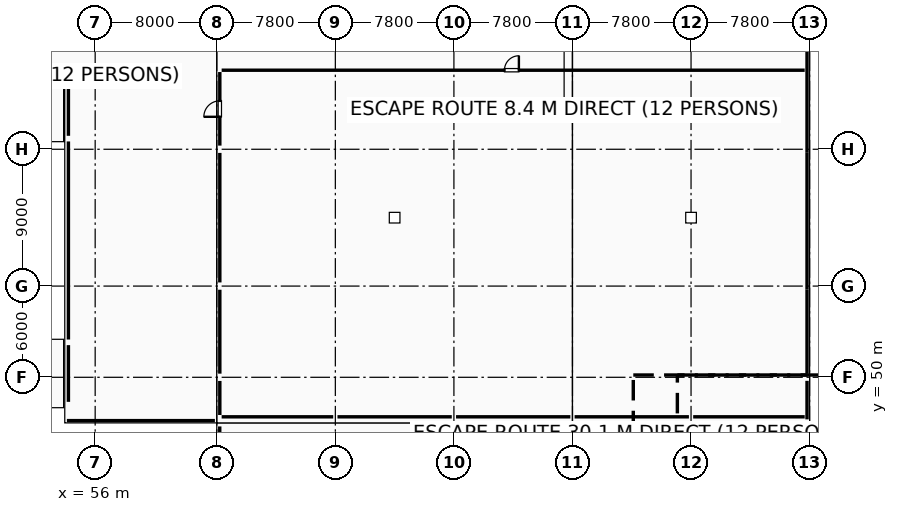
"""IFC4 building model, lengths in metres.
Left out: names, types, materials, properties, quantities, classifications, styles, units other than length and angle.
Written with IfcOpenShell. Run it as: python <this file> out.ifc"""

import sys

from ifc_helpers import new_model, si_unit, direction, frame, frame_2d, origin, origin_2d, place, context, subcontext, project, spatial, rectangle, hollow_rectangle, i_section, extrude, element, fill, save


model = new_model("IFC4")
c1 = context("Model", 3, precision=1e-05, world=origin(), true_north=direction((0.0, 1.0)))
c2 = subcontext(c1, "Body", "Model", "MODEL_VIEW")
j1 = project(units=[si_unit("LENGTHUNIT", "METRE"), si_unit("PLANEANGLEUNIT", "RADIAN")], contexts=[c1])
p1 = place(None, origin())
s1 = spatial("IfcSite", under=j1, at=p1, CompositionType="ELEMENT")
p2 = place(p1, origin())
s2 = spatial("IfcBuilding", under=s1, at=p2, CompositionType="ELEMENT")
p3 = place(p2, frame((0.0, 0.0, 5.4)))
s3 = spatial("IfcBuildingStorey", under=s2, at=p3, CompositionType="ELEMENT", Elevation=5.4)
for number, where, z_axis, x_axis in (
    (1, (56.0, 50.0, 0.0), (0.0, 0.0, 1.0), (1.0, 0.0, 0.0)),
    (2, (56.0, 56.0, 0.0), (0.0, 0.0, 1.0), (1.0, 0.0, 0.0)),
    (3, (56.0, 65.0, 0.0), (0.0, 0.0, 1.0), (1.0, 0.0, 0.0)),
):
    element("IfcColumn", number, at=place(p3, frame(where, z_axis=z_axis, x_axis=x_axis)), inside=s3, PredefinedType="COLUMN", context=c2, shape_type="SweptSolid", body=[
        extrude(rectangle(XDim=0.9, YDim=0.9, at=origin_2d()), origin(), (0.0, 0.0, 1.0), 4.8),
    ])
p4 = place(p3, frame((64.0, 50.0, 0.0), z_axis=(0.0, 0.0, 1.0), x_axis=(1.0, 0.0, 0.0)))
e4 = element("IfcColumn", 4, at=p4, inside=s3, PredefinedType="COLUMN", context=c2, shape_type="SweptSolid", body=[
    extrude(hollow_rectangle(XDim=0.45, YDim=0.45, WallThickness=0.02, at=origin_2d()), origin(), (0.0, 0.0, 1.0), 4.8),
])
for number, where, z_axis, x_axis in (
    (5, (64.0, 56.0, 0.0), (0.0, 0.0, 1.0), (1.0, 0.0, 0.0)),
    (6, (64.0, 65.0, 0.0), (0.0, 0.0, 1.0), (1.0, 0.0, 0.0)),
):
    element("IfcColumn", number, at=place(p3, frame(where, z_axis=z_axis, x_axis=x_axis)), inside=s3, PredefinedType="COLUMN", context=c2, shape_type="SweptSolid", body=[
        extrude(i_section(OverallWidth=0.25, OverallDepth=0.45, WebThickness=0.011, FlangeThickness=0.014, FilletRadius=0.015, at=origin_2d()), origin(), (0.0, 0.0, 1.0), 4.8),
    ])
p5 = place(p3, frame((103.0, 50.0, 0.0), z_axis=(0.0, 0.0, 1.0), x_axis=(1.0, 0.0, 0.0)))
e7 = element("IfcColumn", 7, at=p5, inside=s3, PredefinedType="COLUMN", context=c2, shape_type="SweptSolid", body=[
    extrude(hollow_rectangle(XDim=0.45, YDim=0.45, WallThickness=0.02, at=origin_2d()), origin(), (0.0, 0.0, 1.0), 4.8),
])
for number, where, z_axis, x_axis in (
    (8, (103.0, 56.0, 0.0), (0.0, 0.0, 1.0), (1.0, 0.0, 0.0)),
    (9, (103.0, 65.0, 0.0), (0.0, 0.0, 1.0), (1.0, 0.0, 0.0)),
):
    element("IfcColumn", number, at=place(p3, frame(where, z_axis=z_axis, x_axis=x_axis)), inside=s3, PredefinedType="COLUMN", context=c2, shape_type="SweptSolid", body=[
        extrude(i_section(OverallWidth=0.25, OverallDepth=0.45, WebThickness=0.011, FlangeThickness=0.014, FilletRadius=0.015, at=origin_2d()), origin(), (0.0, 0.0, 1.0), 4.8),
    ])
for number, where, z_axis, x_axis in (
    (10, (54.0, 48.2, 0.0), (0.0, 0.0, 1.0), (1.0, 0.0, 0.0)),
    (11, (54.0, 52.3, 0.0), (0.0, 0.0, 1.0), (1.0, 0.0, 0.0)),
    (12, (54.0, 65.7, 0.0), (0.0, 0.0, 1.0), (1.0, 0.0, 0.0)),
    (13, (54.0, 69.8, 0.0), (0.0, 0.0, 1.0), (1.0, 0.0, 0.0)),
):
    element("IfcColumn", number, at=place(p3, frame(where, z_axis=z_axis, x_axis=x_axis)), inside=s3, PredefinedType="COLUMN", context=c2, shape_type="SweptSolid", body=[
        extrude(i_section(OverallWidth=0.25, OverallDepth=0.35, WebThickness=0.01, FlangeThickness=0.012, FilletRadius=0.012, at=origin_2d()), origin(), (0.0, 0.0, 1.0), 4.8),
    ])
for number, where, z_axis, x_axis in (
    (14, (64.0, 47.0, 0.0), (0.0, 0.0, 1.0), (1.0, 0.0, 0.0)),
    (15, (71.8, 47.0, 0.0), (0.0, 0.0, 1.0), (1.0, 0.0, 0.0)),
    (16, (79.6, 47.0, 0.0), (0.0, 0.0, 1.0), (1.0, 0.0, 0.0)),
    (17, (87.4, 47.0, 0.0), (0.0, 0.0, 1.0), (1.0, 0.0, 0.0)),
    (18, (95.2, 47.0, 0.0), (0.0, 0.0, 1.0), (1.0, 0.0, 0.0)),
    (19, (103.0, 47.0, 0.0), (0.0, 0.0, 1.0), (1.0, 0.0, 0.0)),
):
    element("IfcColumn", number, at=place(p3, frame(where, z_axis=z_axis, x_axis=x_axis)), inside=s3, PredefinedType="COLUMN", context=c2, shape_type="SweptSolid", body=[
        extrude(i_section(OverallWidth=0.25, OverallDepth=0.45, WebThickness=0.011, FlangeThickness=0.014, FilletRadius=0.015, at=origin_2d()), origin(), (0.0, 0.0, 1.0), 4.8),
    ])
p6 = place(p3, frame((64.195, 44.185, 0.0), z_axis=(0.0, 0.0, 1.0), x_axis=(0.0, 1.0, 0.0)))
e20 = element("IfcWall", 20, at=p6, inside=s3, PredefinedType="STANDARD", context=c2, shape_type="SweptSolid", body=[
    extrude(rectangle(XDim=2.582, YDim=0.35, at=frame_2d((1.291, 0.0))), origin(), (0.0, 0.0, 1.0), 3.725),
])
p7 = place(p3, frame((63.876, 47.15, 0.0), z_axis=(0.0, 0.0, 1.0), x_axis=(-1.0, 0.0, 0.0)))
e21 = element("IfcWall", 21, at=p7, inside=s3, PredefinedType="ELEMENTEDWALL", context=c2, shape_type="SweptSolid", body=[
    extrude(rectangle(XDim=9.736, YDim=0.26, at=frame_2d((4.868, 0.0))), origin(), (0.0, 0.0, 1.0), 4.54),
])
p8 = place(p7, frame((4.426, 0.0, 0.95)))
e22 = element("IfcOpeningElement", 22, at=p8, cuts=e21, PredefinedType="OPENING", context=c2, shape_type="SweptSolid", body=[
    extrude(rectangle(XDim=0.9, YDim=2.1, at=frame_2d((0.45, 1.05))), frame((0.0, 0.14, 0.0), z_axis=(0.0, -1.0, 0.0), x_axis=(1.0, 0.0, 0.0)), (0.0, 0.0, 1.0), 0.28),
])
p9 = place(p3, frame((54.24, 48.385, 0.0), z_axis=(0.0, 0.0, 1.0), x_axis=(0.0, 1.0, 0.0)))
e23 = element("IfcWall", 23, at=p9, inside=s3, PredefinedType="PARAPET", context=c2, shape_type="SweptSolid", body=[
    extrude(rectangle(XDim=3.73, YDim=0.18, at=frame_2d((1.865, 0.0))), origin(), (0.0, 0.0, 1.0), 0.88),
])
p10 = place(p3, frame((54.24, 52.485, 0.0), z_axis=(0.0, 0.0, 1.0), x_axis=(0.0, 1.0, 0.0)))
e24 = element("IfcWall", 24, at=p10, inside=s3, PredefinedType="PARAPET", context=c2, shape_type="SweptSolid", body=[
    extrude(rectangle(XDim=13.03, YDim=0.18, at=frame_2d((6.515, 0.0))), origin(), (0.0, 0.0, 1.0), 0.88),
])
p11 = place(p3, frame((54.24, 65.885, 0.0), z_axis=(0.0, 0.0, 1.0), x_axis=(0.0, 1.0, 0.0)))
e25 = element("IfcWall", 25, at=p11, inside=s3, PredefinedType="PARAPET", context=c2, shape_type="SweptSolid", body=[
    extrude(rectangle(XDim=3.73, YDim=0.18, at=frame_2d((1.865, 0.0))), origin(), (0.0, 0.0, 1.0), 0.88),
])
p12 = place(p3, frame((102.83, 73.767, 0.0), z_axis=(0.0, 0.0, 1.0), x_axis=(0.0, -1.0, 0.0)))
e26 = element("IfcWall", 26, at=p12, inside=s3, PredefinedType="STANDARD", context=c2, shape_type="SweptSolid", body=[
    extrude(rectangle(XDim=9.0, YDim=0.3, at=frame_2d((4.5, 0.0))), origin(), (0.0, 0.0, 1.0), 4.075),
])
p13 = place(p3, frame((102.83, 64.767, 0.0), z_axis=(0.0, 0.0, 1.0), x_axis=(0.0, -1.0, 0.0)))
e27 = element("IfcWall", 27, at=p13, inside=s3, PredefinedType="STANDARD", context=c2, shape_type="SweptSolid", body=[
    extrude(rectangle(XDim=9.0, YDim=0.3, at=frame_2d((4.5, 0.0))), origin(), (0.0, 0.0, 1.0), 4.025),
])
p14 = place(p3, frame((102.83, 55.767, 0.0), z_axis=(0.0, 0.0, 1.0), x_axis=(0.0, -1.0, 0.0)))
e28 = element("IfcWall", 28, at=p14, inside=s3, PredefinedType="STANDARD", context=c2, shape_type="SweptSolid", body=[
    extrude(rectangle(XDim=5.534, YDim=0.3, at=frame_2d((2.767, 0.0))), origin(), (0.0, 0.0, 1.0), 3.975),
])
p15 = place(p3, frame((102.83, 49.767, 0.0), z_axis=(0.0, 0.0, 1.0), x_axis=(0.0, -1.0, 0.0)))
e29 = element("IfcWall", 29, at=p15, inside=s3, PredefinedType="STANDARD", context=c2, shape_type="SweptSolid", body=[
    extrude(rectangle(XDim=2.534, YDim=0.3, at=frame_2d((1.267, 0.0))), origin(), (0.0, 0.0, 1.0), 3.925),
])
p16 = place(p3, frame((103.129, 46.805, 0.0), z_axis=(0.0, 0.0, 1.0), x_axis=(1.0, 0.0, 0.0)))
e30 = element("IfcWall", 30, at=p16, inside=s3, PredefinedType="STANDARD", context=c2, shape_type="SweptSolid", body=[
    extrude(rectangle(XDim=15.286, YDim=0.35, at=frame_2d((7.643, 0.0))), origin(), (0.0, 0.0, 1.0), 3.725),
])
p17 = place(p3, frame((64.32, 70.2, 0.0), z_axis=(0.0, 0.0, 1.0), x_axis=(1.0, 0.0, 0.0)))
e31 = element("IfcWall", 31, at=p17, inside=s3, PredefinedType="PARTITIONING", context=c2, shape_type="SweptSolid", body=[
    extrude(rectangle(XDim=38.356, YDim=0.2, at=frame_2d((19.178, 0.0))), origin(), (0.0, 0.0, 1.0), 4.53),
])
p18 = place(p17, frame((18.605, 0.0, 0.0)))
e32 = element("IfcOpeningElement", 32, at=p18, cuts=e31, PredefinedType="OPENING", context=c2, shape_type="SweptSolid", body=[
    extrude(rectangle(XDim=0.95, YDim=2.15, at=frame_2d((0.475, 1.075))), frame((0.0, 0.11, 0.0), z_axis=(0.0, -1.0, 0.0), x_axis=(1.0, 0.0, 0.0)), (0.0, 0.0, 1.0), 0.22),
])
p19 = place(p3, frame((102.676, 47.4, 0.0), z_axis=(0.0, 0.0, 1.0), x_axis=(-1.0, 0.0, 0.0)))
e33 = element("IfcWall", 33, at=p19, inside=s3, PredefinedType="PARTITIONING", context=c2, shape_type="SweptSolid", body=[
    extrude(rectangle(XDim=7.336, YDim=0.2, at=frame_2d((3.668, 0.0))), origin(), (0.0, 0.0, 1.0), 3.72),
])
for number, where, z_axis, x_axis in (
    (34, (95.06, 47.4, 0.0), (0.0, 0.0, 1.0), (-1.0, 0.0, 0.0)),
    (35, (87.26, 47.4, 0.0), (0.0, 0.0, 1.0), (-1.0, 0.0, 0.0)),
    (36, (79.46, 47.4, 0.0), (0.0, 0.0, 1.0), (-1.0, 0.0, 0.0)),
):
    element("IfcWall", number, at=place(p3, frame(where, z_axis=z_axis, x_axis=x_axis)), inside=s3, PredefinedType="PARTITIONING", context=c2, shape_type="SweptSolid", body=[
        extrude(rectangle(XDim=7.52, YDim=0.2, at=frame_2d((3.76, 0.0))), origin(), (0.0, 0.0, 1.0), 3.72),
    ])
p20 = place(p3, frame((71.66, 47.4, 0.0), z_axis=(0.0, 0.0, 1.0), x_axis=(-1.0, 0.0, 0.0)))
e37 = element("IfcWall", 37, at=p20, inside=s3, PredefinedType="PARTITIONING", context=c2, shape_type="SweptSolid", body=[
    extrude(rectangle(XDim=7.34, YDim=0.2, at=frame_2d((3.67, 0.0))), origin(), (0.0, 0.0, 1.0), 3.72),
])
p21 = place(p3, frame((64.2, 47.52, 0.0), z_axis=(0.0, 0.0, 1.0), x_axis=(0.0, 1.0, 0.0)))
e38 = element("IfcWall", 38, at=p21, inside=s3, PredefinedType="PARTITIONING", context=c2, shape_type="SweptSolid", body=[
    extrude(rectangle(XDim=2.24, YDim=0.2, at=frame_2d((1.12, 0.0))), origin(), (0.0, 0.0, 1.0), 3.92),
])
p22 = place(p3, frame((64.2, 50.24, 0.0), z_axis=(0.0, 0.0, 1.0), x_axis=(0.0, 1.0, 0.0)))
e39 = element("IfcWall", 39, at=p22, inside=s3, PredefinedType="PARTITIONING", context=c2, shape_type="SweptSolid", body=[
    extrude(rectangle(XDim=5.52, YDim=0.2, at=frame_2d((2.76, 0.0))), origin(), (0.0, 0.0, 1.0), 3.97),
])
p23 = place(p3, frame((64.2, 56.24, 0.0), z_axis=(0.0, 0.0, 1.0), x_axis=(0.0, 1.0, 0.0)))
e40 = element("IfcWall", 40, at=p23, inside=s3, PredefinedType="PARTITIONING", context=c2, shape_type="SweptSolid", body=[
    extrude(rectangle(XDim=8.52, YDim=0.2, at=frame_2d((4.26, 0.0))), origin(), (0.0, 0.0, 1.0), 4.02),
])
p24 = place(p3, frame((64.2, 65.24, 0.0), z_axis=(0.0, 0.0, 1.0), x_axis=(0.0, 1.0, 0.0)))
e41 = element("IfcWall", 41, at=p24, inside=s3, PredefinedType="PARTITIONING", context=c2, shape_type="SweptSolid", body=[
    extrude(rectangle(XDim=4.84, YDim=0.2, at=frame_2d((2.42, 0.0))), origin(), (0.0, 0.0, 1.0), 4.07),
])
p25 = place(p24, frame((1.895, 0.0, 0.0)))
e42 = element("IfcOpeningElement", 42, at=p25, cuts=e41, PredefinedType="OPENING", context=c2, shape_type="SweptSolid", body=[
    extrude(rectangle(XDim=1.05, YDim=2.15, at=frame_2d((0.525, 1.075))), frame((0.0, 0.11, 0.0), z_axis=(0.0, -1.0, 0.0), x_axis=(1.0, 0.0, 0.0)), (0.0, 0.0, 1.0), 0.22),
])
p26 = place(p8, origin())
e43 = element("IfcWindow", 43, at=p26, inside=s3, PartitioningType="SINGLE_PANEL", PredefinedType="WINDOW", context=c2, shape_type="SweptSolid", body=[
    extrude(rectangle(XDim=0.9, YDim=2.1, at=frame_2d((0.45, 1.05))), frame((0.0, 0.03, 0.0), z_axis=(0.0, -1.0, 0.0), x_axis=(1.0, 0.0, 0.0)), (0.0, 0.0, 1.0), 0.06),
])
fill(e22, e43)
p27 = place(p18, origin())
e44 = element("IfcDoor", 44, at=p27, inside=s3, OperationType="SINGLE_SWING_RIGHT", PredefinedType="DOOR", context=c2, shape_type="SweptSolid", body=[
    extrude(rectangle(XDim=0.95, YDim=2.15, at=frame_2d((0.475, 1.075))), frame((0.0, 0.025, 0.0), z_axis=(0.0, -1.0, 0.0), x_axis=(1.0, 0.0, 0.0)), (0.0, 0.0, 1.0), 0.05),
])
fill(e32, e44)
p28 = place(p25, origin())
e45 = element("IfcDoor", 45, at=p28, inside=s3, OperationType="SINGLE_SWING_LEFT", PredefinedType="DOOR", context=c2, shape_type="SweptSolid", body=[
    extrude(rectangle(XDim=1.05, YDim=2.15, at=frame_2d((0.525, 1.075))), frame((0.0, 0.025, 0.0), z_axis=(0.0, -1.0, 0.0), x_axis=(1.0, 0.0, 0.0)), (0.0, 0.0, 1.0), 0.05),
])
fill(e42, e45)
save(model, sys.argv[1])
